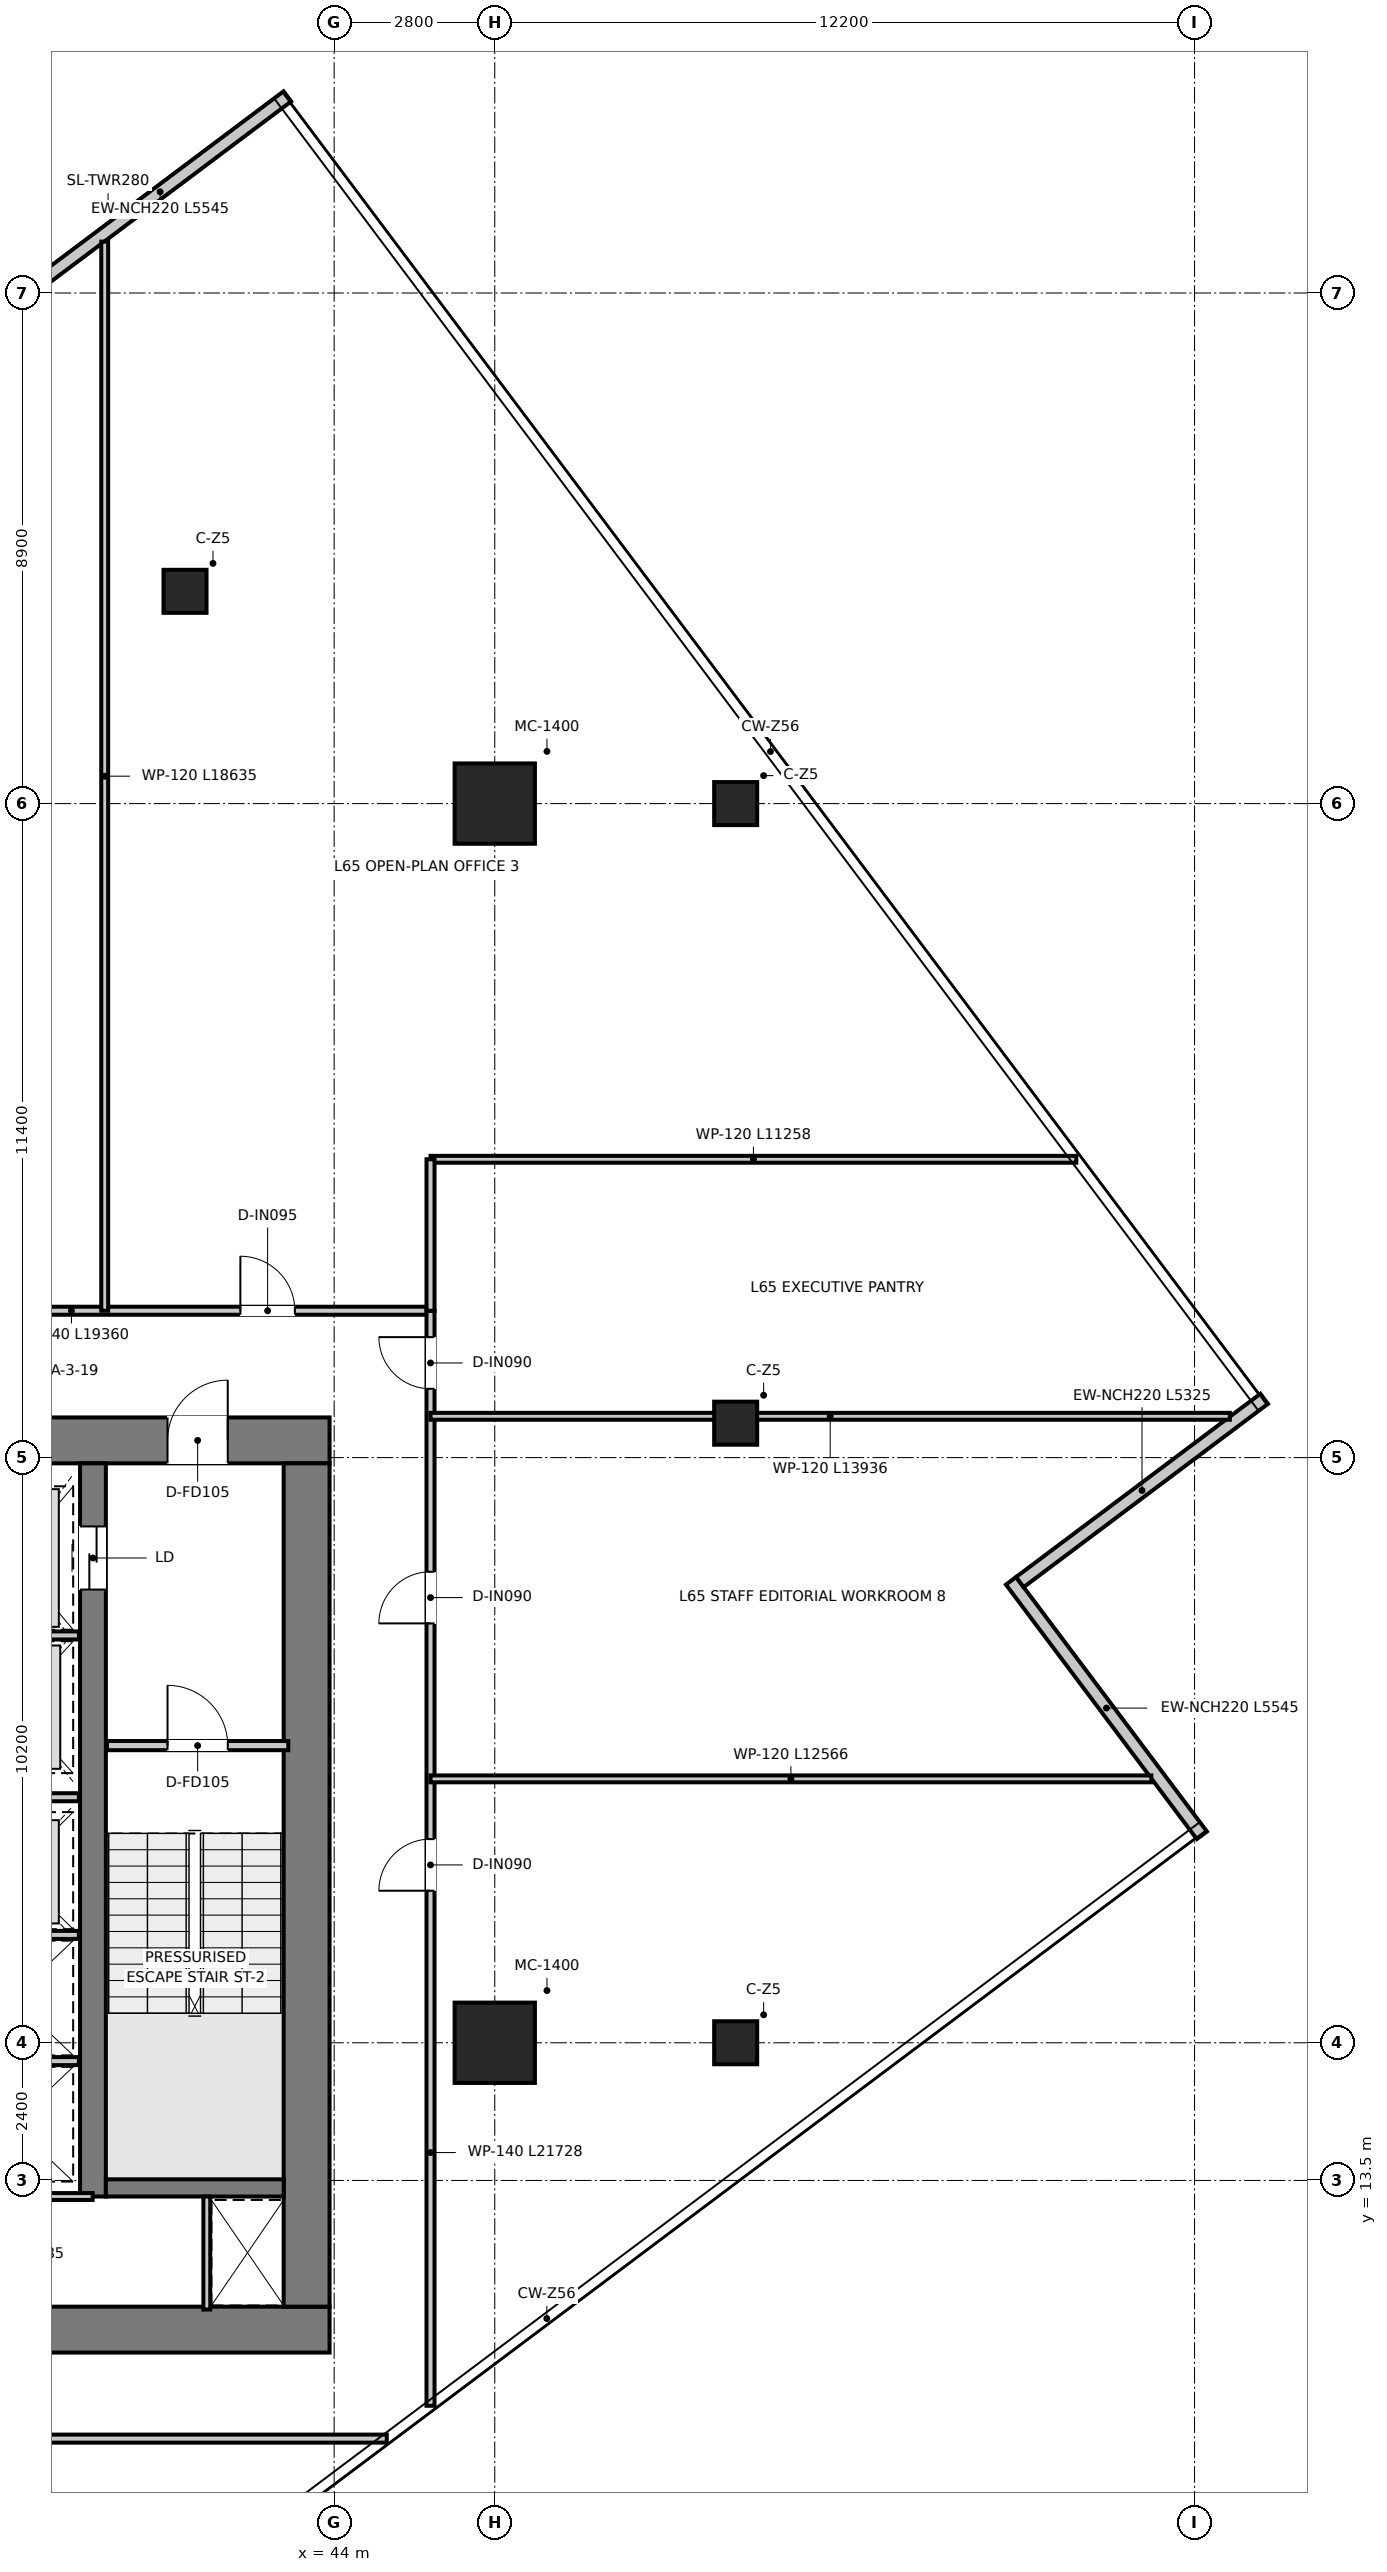
"""IFC4 building model, lengths in metres.
Left out: names, types, materials, properties, quantities, classifications, styles, units other than length and angle.
Written with IfcOpenShell. Run it as: python <this file> out.ifc"""

import sys

from ifc_helpers import new_model, si_unit, direction, frame, frame_2d, origin, origin_2d, place, context, subcontext, project, spatial, rectangle, extrude, source, transform, mapped, element, fill, save


model = new_model("IFC4")
c1 = context("Model", 3, precision=1e-05, world=origin(), true_north=direction((0.0, 1.0)))
c2 = subcontext(c1, "Body", "Model", "MODEL_VIEW")
j1 = project(units=[si_unit("LENGTHUNIT", "METRE"), si_unit("PLANEANGLEUNIT", "RADIAN")], contexts=[c1])
p1 = place(None, origin())
s1 = spatial("IfcSite", under=j1, at=p1, CompositionType="ELEMENT")
p2 = place(p1, origin())
s2 = spatial("IfcBuilding", under=s1, at=p2, CompositionType="ELEMENT")
p3 = place(p2, frame((0.0, 0.0, 267.4)))
s3 = spatial("IfcBuildingStorey", under=s2, at=p3, CompositionType="ELEMENT", Elevation=267.4)
p4 = place(p3, frame((28.08, 10.9, 0.0), z_axis=(0.0, 0.0, 1.0), x_axis=(1.0, 0.0, 0.0)))
e1 = element("IfcWall", 1, at=p4, inside=s3, PredefinedType="SHEAR", context=c2, shape_type="SweptSolid", body=[
    extrude(rectangle(XDim=15.84, YDim=0.8, at=frame_2d((7.92, 0.0))), origin(), (0.0, 0.0, 1.0), 3.95),
])
p5 = place(p3, frame((28.08, 26.4, 0.0), z_axis=(0.0, 0.0, 1.0), x_axis=(1.0, 0.0, 0.0)))
e2 = element("IfcWall", 2, at=p5, inside=s3, PredefinedType="SHEAR", context=c2, shape_type="SweptSolid", body=[
    extrude(rectangle(XDim=15.84, YDim=0.8, at=frame_2d((7.92, 0.0))), origin(), (0.0, 0.0, 1.0), 3.95),
])
p6 = place(p5, frame((7.22, 0.0, 0.0)))
e3 = element("IfcOpeningElement", 3, at=p6, cuts=e2, PredefinedType="OPENING", context=c2, shape_type="SweptSolid", body=[
    extrude(rectangle(XDim=1.4, YDim=2.2, at=frame_2d((0.7, 1.1))), frame((0.0, 0.41, 0.0), z_axis=(0.0, -1.0, 0.0), x_axis=(1.0, 0.0, 0.0)), (0.0, 0.0, 1.0), 0.82),
])
p7 = place(p5, frame((1.775, 0.0, 0.0)))
e4 = element("IfcOpeningElement", 4, at=p7, cuts=e2, PredefinedType="OPENING", context=c2, shape_type="SweptSolid", body=[
    extrude(rectangle(XDim=1.05, YDim=2.1, at=frame_2d((0.525, 1.05))), frame((0.0, 0.41, 0.0), z_axis=(0.0, -1.0, 0.0), x_axis=(1.0, 0.0, 0.0)), (0.0, 0.0, 1.0), 0.82),
])
p8 = place(p5, frame((13.015, 0.0, 0.0)))
e5 = element("IfcOpeningElement", 5, at=p8, cuts=e2, PredefinedType="OPENING", context=c2, shape_type="SweptSolid", body=[
    extrude(rectangle(XDim=1.05, YDim=2.1, at=frame_2d((0.525, 1.05))), frame((0.0, 0.41, 0.0), z_axis=(0.0, -1.0, 0.0), x_axis=(1.0, 0.0, 0.0)), (0.0, 0.0, 1.0), 0.82),
])
p9 = place(p3, frame((43.52, 11.3, 0.0), z_axis=(0.0, 0.0, 1.0), x_axis=(0.0, 1.0, 0.0)))
e6 = element("IfcWall", 6, at=p9, inside=s3, PredefinedType="SHEAR", context=c2, shape_type="SweptSolid", body=[
    extrude(rectangle(XDim=14.7, YDim=0.8, at=frame_2d((7.35, 0.0))), origin(), (0.0, 0.0, 1.0), 3.95),
])
p10 = place(p3, frame((39.795, 13.22, 0.0), z_axis=(0.0, 0.0, 1.0), x_axis=(0.0, 1.0, 0.0)))
e7 = element("IfcWall", 7, at=p10, inside=s3, PredefinedType="SHEAR", context=c2, shape_type="SweptSolid", body=[
    extrude(rectangle(XDim=12.78, YDim=0.45, at=frame_2d((6.39, 0.0))), origin(), (0.0, 0.0, 1.0), 3.95),
])
p11 = place(p10, frame((10.58, 0.0, 0.0)))
e8 = element("IfcOpeningElement", 8, at=p11, cuts=e7, PredefinedType="OPENING", context=c2, shape_type="SweptSolid", body=[
    extrude(rectangle(XDim=1.1, YDim=2.15, at=frame_2d((0.55, 1.075))), frame((0.0, 0.235, 0.0), z_axis=(0.0, -1.0, 0.0), x_axis=(1.0, 0.0, 0.0)), (0.0, 0.0, 1.0), 0.47),
])
p12 = place(p3, frame((40.02, 13.37, 0.0), z_axis=(0.0, 0.0, 1.0), x_axis=(1.0, 0.0, 0.0)))
e9 = element("IfcWall", 9, at=p12, inside=s3, PredefinedType="SHEAR", context=c2, shape_type="SweptSolid", body=[
    extrude(rectangle(XDim=3.1, YDim=0.3, at=frame_2d((1.55, 0.0))), origin(), (0.0, 0.0, 1.0), 3.95),
])
m1 = source(origin(), c2, "Body", "SweptSolid", [
    extrude(rectangle(XDim=1.4, YDim=1.4, at=origin_2d()), origin(), (0.0, 0.0, 1.0), 3.95),
])
for number, where, z_axis, x_axis in (
    (10, (46.8, 15.9, 0.0), (0.0, 0.0, 1.0), (1.0, 0.0, 0.0)),
    (11, (46.8, 37.5, 0.0), (0.0, 0.0, 1.0), (1.0, 0.0, 0.0)),
):
    element("IfcColumn", number, at=place(p3, frame(where, z_axis=z_axis, x_axis=x_axis)), inside=s3, PredefinedType="USERDEFINED", context=c2, shape_type="MappedRepresentation", body=[
        mapped(m1, transform((0.0, 0.0, 0.0), x_axis=(1.0, 0.0, 0.0), y_axis=(0.0, 1.0, 0.0), z_axis=(0.0, 0.0, 1.0), scale=1.0)),
    ])
m2 = source(origin(), c2, "Body", "SweptSolid", [
    extrude(rectangle(XDim=0.75, YDim=0.75, at=origin_2d()), origin(), (0.0, 0.0, 1.0), 3.95),
])
for number, where, z_axis, x_axis in (
    (12, (41.4, 41.2, 0.0), (0.0, 0.0, 1.0), (1.0, 0.0, 0.0)),
    (13, (51.0, 37.5, 0.0), (0.0, 0.0, 1.0), (1.0, 0.0, 0.0)),
    (14, (51.0, 26.7, 0.0), (0.0, 0.0, 1.0), (1.0, 0.0, 0.0)),
    (15, (51.0, 15.9, 0.0), (0.0, 0.0, 1.0), (1.0, 0.0, 0.0)),
):
    element("IfcColumn", number, at=place(p3, frame(where, z_axis=z_axis, x_axis=x_axis)), inside=s3, PredefinedType="COLUMN", context=c2, shape_type="MappedRepresentation", body=[
        mapped(m2, transform((0.0, 0.0, 0.0), x_axis=(1.0, 0.0, 0.0), y_axis=(0.0, 1.0, 0.0), z_axis=(0.0, 0.0, 1.0), scale=1.0)),
    ])
p13 = place(p3, frame((59.128, 19.516, 0.0), z_axis=(0.0, 0.0, 1.0), x_axis=(-0.600084534203, 0.799936592369, 0.0)))
e16 = element("IfcWall", 16, at=p13, inside=s3, PredefinedType="ELEMENTEDWALL", context=c2, shape_type="SweptSolid", body=[
    extrude(rectangle(XDim=5.545, YDim=0.22, at=frame_2d((2.772, 0.0))), origin(), (0.0, 0.0, 1.0), 3.67),
])
p14 = place(p3, frame((55.954, 23.93, 0.0), z_axis=(0.0, 0.0, 1.0), x_axis=(0.799917465268, 0.600110030544, 0.0)))
e17 = element("IfcWall", 17, at=p14, inside=s3, PredefinedType="ELEMENTEDWALL", context=c2, shape_type="SweptSolid", body=[
    extrude(rectangle(XDim=5.325, YDim=0.22, at=frame_2d((2.663, 0.0))), origin(), (0.0, 0.0, 1.0), 3.67),
])
p15 = place(p3, frame((43.184, 49.828, 0.0), z_axis=(0.0, 0.0, 1.0), x_axis=(-0.799936592369, -0.600084534203, 0.0)))
e18 = element("IfcWall", 18, at=p15, inside=s3, PredefinedType="ELEMENTEDWALL", context=c2, shape_type="SweptSolid", body=[
    extrude(rectangle(XDim=5.545, YDim=0.22, at=frame_2d((2.772, 0.0))), origin(), (0.0, 0.0, 1.0), 3.67),
])
p16 = place(p3, frame((40.04, 21.08, 0.0), z_axis=(0.0, 0.0, 1.0), x_axis=(1.0, 0.0, 0.0)))
e19 = element("IfcWall", 19, at=p16, inside=s3, PredefinedType="PARTITIONING", context=c2, shape_type="SweptSolid", body=[
    extrude(rectangle(XDim=3.16, YDim=0.16, at=frame_2d((1.58, 0.0))), origin(), (0.0, 0.0, 1.0), 3.67),
])
p17 = place(p16, frame((1.055, 0.0, 0.0)))
e20 = element("IfcOpeningElement", 20, at=p17, cuts=e19, PredefinedType="OPENING", context=c2, shape_type="SweptSolid", body=[
    extrude(rectangle(XDim=1.05, YDim=2.1, at=frame_2d((0.525, 1.05))), frame((0.0, 0.09, 0.0), z_axis=(0.0, -1.0, 0.0), x_axis=(1.0, 0.0, 0.0)), (0.0, 0.0, 1.0), 0.18),
])
p18 = place(p3, frame((37.28, 23.0, 0.0), z_axis=(0.0, 0.0, 1.0), x_axis=(1.0, 0.0, 0.0)))
e21 = element("IfcWall", 21, at=p18, inside=s3, PredefinedType="PARTITIONING", context=c2, shape_type="SweptSolid", body=[
    extrude(rectangle(XDim=2.27, YDim=0.14, at=frame_2d((1.135, 0.0))), origin(), (0.0, 0.0, 1.0), 2.82),
])
for number, where, z_axis, x_axis in (
    (22, (37.28, 17.78, 0.0), (0.0, 0.0, 1.0), (1.0, 0.0, 0.0)),
    (23, (37.28, 20.18, 0.0), (0.0, 0.0, 1.0), (1.0, 0.0, 0.0)),
    (24, (37.28, 15.58, 0.0), (0.0, 0.0, 1.0), (1.0, 0.0, 0.0)),
):
    element("IfcWall", number, at=place(p3, frame(where, z_axis=z_axis, x_axis=x_axis)), inside=s3, PredefinedType="PARTITIONING", context=c2, shape_type="SweptSolid", body=[
        extrude(rectangle(XDim=2.27, YDim=0.14, at=frame_2d((1.135, 0.0))), origin(), (0.0, 0.0, 1.0), 3.67),
    ])
p19 = place(p3, frame((41.78, 11.25, 0.0), z_axis=(0.0, 0.0, 1.0), x_axis=(0.0, 1.0, 0.0)))
e25 = element("IfcWall", 25, at=p19, inside=s3, PredefinedType="PARTITIONING", context=c2, shape_type="SweptSolid", body=[
    extrude(rectangle(XDim=1.97, YDim=0.12, at=frame_2d((0.985, 0.0))), origin(), (0.0, 0.0, 1.0), 3.67),
])
p20 = place(p3, frame((32.21, 13.22, 0.0), z_axis=(0.0, 0.0, 1.0), x_axis=(1.0, 0.0, 0.0)))
e26 = element("IfcWall", 26, at=p20, inside=s3, PredefinedType="PARTITIONING", context=c2, shape_type="SweptSolid", body=[
    extrude(rectangle(XDim=7.58, YDim=0.12, at=frame_2d((3.79, 0.0))), origin(), (0.0, 0.0, 1.0), 3.67),
])
p21 = place(p20, frame((3.365, 0.0, 0.0)))
e27 = element("IfcOpeningElement", 27, at=p21, cuts=e26, PredefinedType="OPENING", context=c2, shape_type="SweptSolid", body=[
    extrude(rectangle(XDim=0.85, YDim=2.1, at=frame_2d((0.425, 1.05))), frame((0.0, 0.07, 0.0), z_axis=(0.0, -1.0, 0.0), x_axis=(1.0, 0.0, 0.0)), (0.0, 0.0, 1.0), 0.14),
])
p22 = place(p3, frame((26.32, 28.66, 0.0), z_axis=(0.0, 0.0, 1.0), x_axis=(1.0, 0.0, 0.0)))
e28 = element("IfcWall", 28, at=p22, inside=s3, PredefinedType="PARTITIONING", context=c2, shape_type="SweptSolid", body=[
    extrude(rectangle(XDim=19.36, YDim=0.14, at=frame_2d((9.68, 0.0))), origin(), (0.0, 0.0, 1.0), 3.18),
])
p23 = place(p22, frame((2.365, 0.0, 0.0)))
e29 = element("IfcOpeningElement", 29, at=p23, cuts=e28, PredefinedType="OPENING", context=c2, shape_type="SweptSolid", body=[
    extrude(rectangle(XDim=0.95, YDim=2.1, at=frame_2d((0.475, 1.05))), frame((0.0, 0.08, 0.0), z_axis=(0.0, -1.0, 0.0), x_axis=(1.0, 0.0, 0.0)), (0.0, 0.0, 1.0), 0.16),
])
p24 = place(p22, frame((9.205, 0.0, 0.0)))
e30 = element("IfcOpeningElement", 30, at=p24, cuts=e28, PredefinedType="OPENING", context=c2, shape_type="SweptSolid", body=[
    extrude(rectangle(XDim=0.95, YDim=2.1, at=frame_2d((0.475, 1.05))), frame((0.0, 0.08, 0.0), z_axis=(0.0, -1.0, 0.0), x_axis=(1.0, 0.0, 0.0)), (0.0, 0.0, 1.0), 0.16),
])
p25 = place(p22, frame((16.045, 0.0, 0.0)))
e31 = element("IfcOpeningElement", 31, at=p25, cuts=e28, PredefinedType="OPENING", context=c2, shape_type="SweptSolid", body=[
    extrude(rectangle(XDim=0.95, YDim=2.1, at=frame_2d((0.475, 1.05))), frame((0.0, 0.08, 0.0), z_axis=(0.0, -1.0, 0.0), x_axis=(1.0, 0.0, 0.0)), (0.0, 0.0, 1.0), 0.16),
])
p26 = place(p3, frame((45.68, 9.572, 0.0), z_axis=(0.0, 0.0, 1.0), x_axis=(0.0, 1.0, 0.0)))
e32 = element("IfcWall", 32, at=p26, inside=s3, PredefinedType="PARTITIONING", context=c2, shape_type="SweptSolid", body=[
    extrude(rectangle(XDim=19.088, YDim=0.14, at=frame_2d((9.544, 0.0))), origin(), (0.0, 0.0, 1.0), 3.13),
])
p27 = place(p26, frame((17.728, 0.0, 0.0)))
e33 = element("IfcOpeningElement", 33, at=p27, cuts=e32, PredefinedType="OPENING", context=c2, shape_type="SweptSolid", body=[
    extrude(rectangle(XDim=0.9, YDim=2.1, at=frame_2d((0.45, 1.05))), frame((0.0, 0.08, 0.0), z_axis=(0.0, -1.0, 0.0), x_axis=(1.0, 0.0, 0.0)), (0.0, 0.0, 1.0), 0.16),
])
p28 = place(p26, frame((8.978, 0.0, 0.0)))
e34 = element("IfcOpeningElement", 34, at=p28, cuts=e32, PredefinedType="OPENING", context=c2, shape_type="SweptSolid", body=[
    extrude(rectangle(XDim=0.9, YDim=2.1, at=frame_2d((0.45, 1.05))), frame((0.0, 0.08, 0.0), z_axis=(0.0, -1.0, 0.0), x_axis=(1.0, 0.0, 0.0)), (0.0, 0.0, 1.0), 0.16),
])
p29 = place(p26, frame((13.638, 0.0, 0.0)))
e35 = element("IfcOpeningElement", 35, at=p29, cuts=e32, PredefinedType="OPENING", context=c2, shape_type="SweptSolid", body=[
    extrude(rectangle(XDim=0.9, YDim=2.1, at=frame_2d((0.45, 1.05))), frame((0.0, 0.08, 0.0), z_axis=(0.0, -1.0, 0.0), x_axis=(1.0, 0.0, 0.0)), (0.0, 0.0, 1.0), 0.16),
])
p30 = place(p3, frame((24.888, 9.0, 0.0), z_axis=(0.0, 0.0, 1.0), x_axis=(1.0, 0.0, 0.0)))
e36 = element("IfcWall", 36, at=p30, inside=s3, PredefinedType="PARTITIONING", context=c2, shape_type="SweptSolid", body=[
    extrude(rectangle(XDim=20.029, YDim=0.14, at=frame_2d((10.015, 0.0))), origin(), (0.0, 0.0, 1.0), 3.67),
])
p31 = place(p30, frame((10.662, 0.0, 0.0)))
e37 = element("IfcOpeningElement", 37, at=p31, cuts=e36, PredefinedType="OPENING", context=c2, shape_type="SweptSolid", body=[
    extrude(rectangle(XDim=0.9, YDim=2.1, at=frame_2d((0.45, 1.05))), frame((0.0, 0.08, 0.0), z_axis=(0.0, -1.0, 0.0), x_axis=(1.0, 0.0, 0.0)), (0.0, 0.0, 1.0), 0.16),
])
p32 = place(p3, frame((45.68, 26.82, 0.0), z_axis=(0.0, 0.0, 1.0), x_axis=(1.0, 0.0, 0.0)))
e38 = element("IfcWall", 38, at=p32, inside=s3, PredefinedType="PARTITIONING", context=c2, shape_type="SweptSolid", body=[
    extrude(rectangle(XDim=13.936, YDim=0.12, at=frame_2d((6.968, 0.0))), origin(), (0.0, 0.0, 1.0), 3.13),
])
p33 = place(p3, frame((45.68, 31.3, 0.0), z_axis=(0.0, 0.0, 1.0), x_axis=(1.0, 0.0, 0.0)))
e39 = element("IfcWall", 39, at=p33, inside=s3, PredefinedType="PARTITIONING", context=c2, shape_type="SweptSolid", body=[
    extrude(rectangle(XDim=11.259, YDim=0.12, at=frame_2d((5.629, 0.0))), origin(), (0.0, 0.0, 1.0), 3.13),
])
p34 = place(p3, frame((45.68, 28.66, 0.0), z_axis=(0.0, 0.0, 1.0), x_axis=(0.0, 1.0, 0.0)))
e40 = element("IfcWall", 40, at=p34, inside=s3, PredefinedType="PARTITIONING", context=c2, shape_type="SweptSolid", body=[
    extrude(rectangle(XDim=2.64, YDim=0.14, at=frame_2d((1.32, 0.0))), origin(), (0.0, 0.0, 1.0), 3.43),
])
p35 = place(p3, frame((40.0, 28.66, 0.0), z_axis=(0.0, 0.0, 1.0), x_axis=(0.0, 1.0, 0.0)))
e41 = element("IfcWall", 41, at=p35, inside=s3, PredefinedType="PARTITIONING", context=c2, shape_type="SweptSolid", body=[
    extrude(rectangle(XDim=18.635, YDim=0.12, at=frame_2d((9.318, 0.0))), origin(), (0.0, 0.0, 1.0), 3.13),
])
p36 = place(p3, frame((45.68, 20.5, 0.0), z_axis=(0.0, 0.0, 1.0), x_axis=(1.0, 0.0, 0.0)))
e42 = element("IfcWall", 42, at=p36, inside=s3, PredefinedType="PARTITIONING", context=c2, shape_type="SweptSolid", body=[
    extrude(rectangle(XDim=12.566, YDim=0.12, at=frame_2d((6.283, 0.0))), origin(), (0.0, 0.0, 1.0), 3.13),
])
p37 = place(p17, origin())
e43 = element("IfcDoor", 43, at=p37, inside=s3, OperationType="SINGLE_SWING_LEFT", PredefinedType="DOOR", context=c2, shape_type="SweptSolid", body=[
    extrude(rectangle(XDim=1.05, YDim=2.1, at=frame_2d((0.525, 1.05))), frame((0.0, 0.025, 0.0), z_axis=(0.0, -1.0, 0.0), x_axis=(1.0, 0.0, 0.0)), (0.0, 0.0, 1.0), 0.05),
])
fill(e20, e43)
p38 = place(p8, origin())
e44 = element("IfcDoor", 44, at=p38, inside=s3, OperationType="SINGLE_SWING_RIGHT", PredefinedType="DOOR", context=c2, shape_type="SweptSolid", body=[
    extrude(rectangle(XDim=1.05, YDim=2.1, at=frame_2d((0.525, 1.05))), frame((0.0, 0.025, 0.0), z_axis=(0.0, -1.0, 0.0), x_axis=(1.0, 0.0, 0.0)), (0.0, 0.0, 1.0), 0.05),
])
fill(e5, e44)
p39 = place(p11, origin())
e45 = element("IfcDoor", 45, at=p39, inside=s3, OperationType="DOUBLE_DOOR_SLIDING", PredefinedType="DOOR", context=c2, shape_type="SweptSolid", body=[
    extrude(rectangle(XDim=1.1, YDim=2.15, at=frame_2d((0.55, 1.075))), frame((0.0, 0.025, 0.0), z_axis=(0.0, -1.0, 0.0), x_axis=(1.0, 0.0, 0.0)), (0.0, 0.0, 1.0), 0.05),
])
fill(e8, e45)
p40 = place(p27, origin())
e46 = element("IfcDoor", 46, at=p40, inside=s3, OperationType="SINGLE_SWING_RIGHT", PredefinedType="DOOR", context=c2, shape_type="SweptSolid", body=[
    extrude(rectangle(XDim=0.9, YDim=2.1, at=frame_2d((0.45, 1.05))), frame((0.0, 0.025, 0.0), z_axis=(0.0, -1.0, 0.0), x_axis=(1.0, 0.0, 0.0)), (0.0, 0.0, 1.0), 0.05),
])
fill(e33, e46)
p41 = place(p25, origin())
e47 = element("IfcDoor", 47, at=p41, inside=s3, OperationType="SINGLE_SWING_LEFT", PredefinedType="DOOR", context=c2, shape_type="SweptSolid", body=[
    extrude(rectangle(XDim=0.95, YDim=2.1, at=frame_2d((0.475, 1.05))), frame((0.0, 0.025, 0.0), z_axis=(0.0, -1.0, 0.0), x_axis=(1.0, 0.0, 0.0)), (0.0, 0.0, 1.0), 0.05),
])
fill(e31, e47)
p42 = place(p28, origin())
e48 = element("IfcDoor", 48, at=p42, inside=s3, OperationType="SINGLE_SWING_LEFT", PredefinedType="DOOR", context=c2, shape_type="SweptSolid", body=[
    extrude(rectangle(XDim=0.9, YDim=2.1, at=frame_2d((0.45, 1.05))), frame((0.0, 0.025, 0.0), z_axis=(0.0, -1.0, 0.0), x_axis=(1.0, 0.0, 0.0)), (0.0, 0.0, 1.0), 0.05),
])
fill(e34, e48)
p43 = place(p29, origin())
e49 = element("IfcDoor", 49, at=p43, inside=s3, OperationType="SINGLE_SWING_LEFT", PredefinedType="DOOR", context=c2, shape_type="SweptSolid", body=[
    extrude(rectangle(XDim=0.9, YDim=2.1, at=frame_2d((0.45, 1.05))), frame((0.0, 0.025, 0.0), z_axis=(0.0, -1.0, 0.0), x_axis=(1.0, 0.0, 0.0)), (0.0, 0.0, 1.0), 0.05),
])
fill(e35, e49)
save(model, sys.argv[1])
